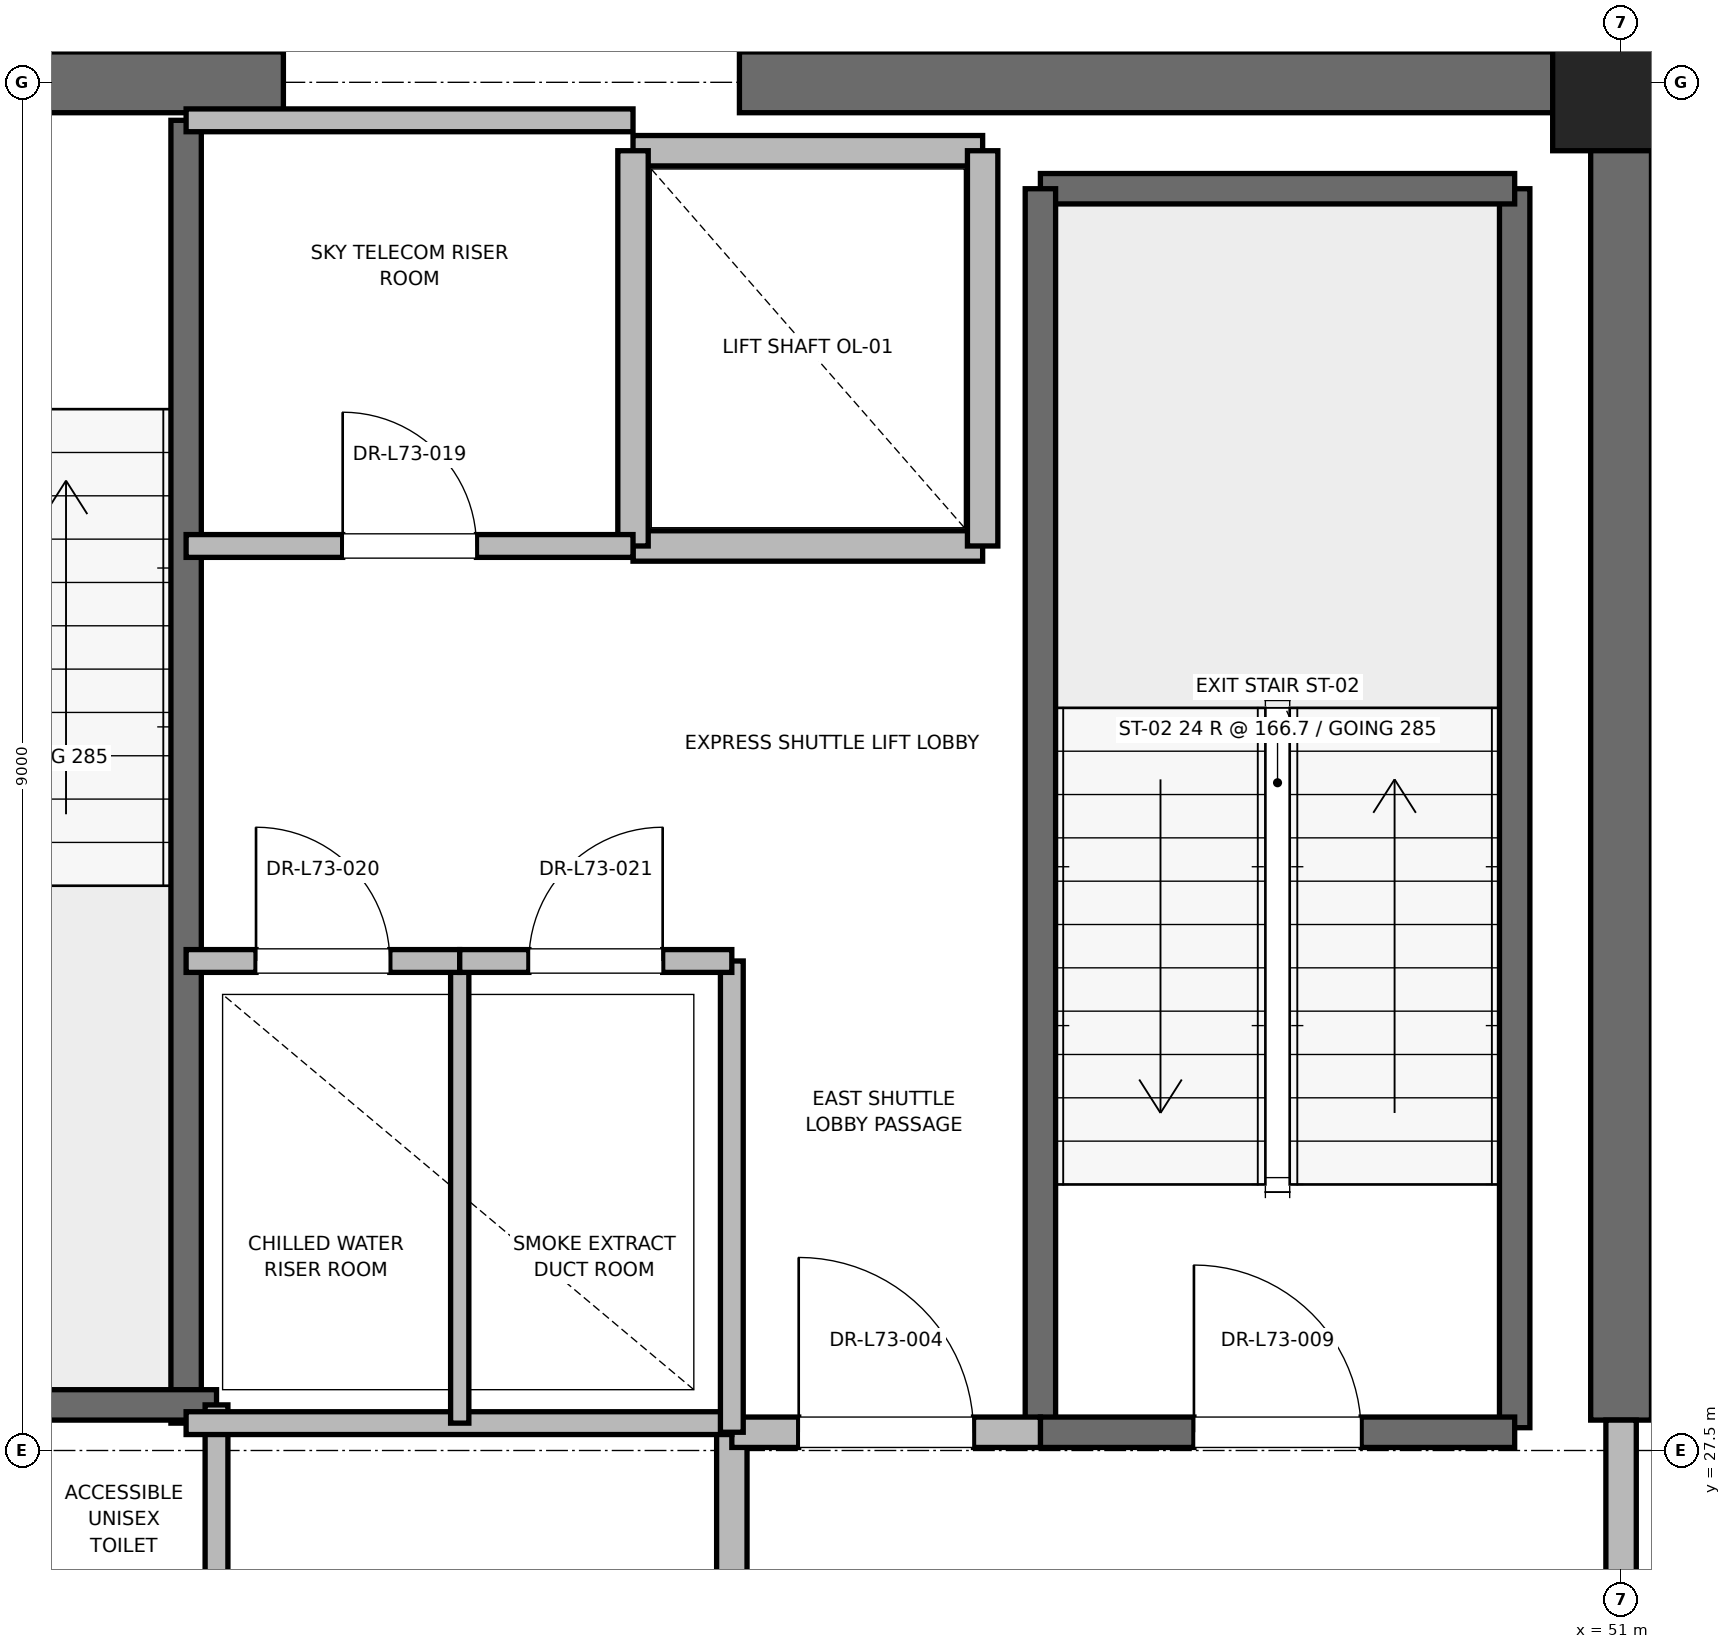
"""IFC4 building model, lengths in metres.
Left out: names, types, materials, properties, quantities, classifications, styles, units other than length and angle.
Written with IfcOpenShell. Run it as: python <this file> out.ifc"""

import sys

from ifc_helpers import new_model, si_unit, direction, frame, frame_2d, origin, origin_2d, place, context, subcontext, project, spatial, rectangle, extrude, element, fill, save


model = new_model("IFC4")
c1 = context("Model", 3, precision=1e-05, world=origin(), true_north=direction((0.0, 1.0)))
c2 = subcontext(c1, "Body", "Model", "MODEL_VIEW")
j1 = project(units=[si_unit("LENGTHUNIT", "METRE"), si_unit("PLANEANGLEUNIT", "RADIAN")], contexts=[c1])
p1 = place(None, origin())
s1 = spatial("IfcSite", under=j1, at=p1, CompositionType="ELEMENT")
p2 = place(p1, origin())
s2 = spatial("IfcBuilding", under=s1, at=p2, CompositionType="ELEMENT")
p3 = place(p2, frame((0.0, 0.0, 314.8)))
s3 = spatial("IfcBuildingStorey", under=s2, at=p3, CompositionType="ELEMENT", Elevation=314.8)
p4 = place(p3, frame((51.0, 36.5, 0.0), z_axis=(0.0, 0.0, 1.0), x_axis=(1.0, 0.0, 0.0)))
e1 = element("IfcColumn", 1, at=p4, inside=s3, PredefinedType="PILASTER", context=c2, shape_type="SweptSolid", body=[
    extrude(rectangle(XDim=0.9, YDim=0.9, at=origin_2d()), origin(), (0.0, 0.0, 1.0), 4.0),
])
p5 = place(p3, frame((37.8, 36.5, 0.0), z_axis=(0.0, 0.0, 1.0), x_axis=(1.0, 0.0, 0.0)))
e2 = element("IfcWall", 2, at=p5, inside=s3, PredefinedType="SHEAR", context=c2, shape_type="SweptSolid", body=[
    extrude(rectangle(XDim=4.4, YDim=0.4, at=frame_2d((2.2, 0.0))), origin(), (0.0, 0.0, 1.0), 3.785),
])
p6 = place(p5, frame((1.65, 0.0, 0.0)))
e3 = element("IfcOpeningElement", 3, at=p6, cuts=e2, PredefinedType="OPENING", context=c2, shape_type="SweptSolid", body=[
    extrude(rectangle(XDim=1.1, YDim=2.15, at=frame_2d((0.55, 1.075))), frame((0.0, 0.2, 0.0), z_axis=(0.0, -1.0, 0.0), x_axis=(1.0, 0.0, 0.0)), (0.0, 0.0, 1.0), 0.4),
])
p7 = place(p3, frame((45.2, 36.5, 0.0), z_axis=(0.0, 0.0, 1.0), x_axis=(1.0, 0.0, 0.0)))
e4 = element("IfcWall", 4, at=p7, inside=s3, PredefinedType="SHEAR", context=c2, shape_type="SweptSolid", body=[
    extrude(rectangle(XDim=5.8, YDim=0.4, at=frame_2d((2.9, 0.0))), origin(), (0.0, 0.0, 1.0), 3.785),
])
p8 = place(p3, frame((51.0, 27.7, 0.0), z_axis=(0.0, 0.0, 1.0), x_axis=(0.0, 1.0, 0.0)))
e5 = element("IfcWall", 5, at=p8, inside=s3, PredefinedType="SHEAR", context=c2, shape_type="SweptSolid", body=[
    extrude(rectangle(XDim=8.8, YDim=0.4, at=frame_2d((4.4, 0.0))), origin(), (0.0, 0.0, 1.0), 3.785),
])
p9 = place(p3, frame((50.3, 27.65, 0.0), z_axis=(0.0, 0.0, 1.0), x_axis=(0.0, 1.0, 0.0)))
e6 = element("IfcWall", 6, at=p9, inside=s3, PredefinedType="SOLIDWALL", context=c2, shape_type="SweptSolid", body=[
    extrude(rectangle(XDim=8.15, YDim=0.2, at=frame_2d((4.075, 0.0))), origin(), (0.0, 0.0, 1.0), 3.785),
])
p10 = place(p3, frame((47.18, 35.8, 0.0), z_axis=(0.0, 0.0, 1.0), x_axis=(1.0, 0.0, 0.0)))
e7 = element("IfcWall", 7, at=p10, inside=s3, PredefinedType="SOLIDWALL", context=c2, shape_type="SweptSolid", body=[
    extrude(rectangle(XDim=3.12, YDim=0.2, at=frame_2d((1.56, 0.0))), origin(), (0.0, 0.0, 1.0), 3.785),
])
p11 = place(p3, frame((47.18, 27.62, 0.0), z_axis=(0.0, 0.0, 1.0), x_axis=(0.0, 1.0, 0.0)))
e8 = element("IfcWall", 8, at=p11, inside=s3, PredefinedType="SOLIDWALL", context=c2, shape_type="SweptSolid", body=[
    extrude(rectangle(XDim=8.18, YDim=0.2, at=frame_2d((4.09, 0.0))), origin(), (0.0, 0.0, 1.0), 3.785),
])
p12 = place(p3, frame((47.18, 27.62, 0.0), z_axis=(0.0, 0.0, 1.0), x_axis=(1.0, 0.0, 0.0)))
e9 = element("IfcWall", 9, at=p12, inside=s3, PredefinedType="SOLIDWALL", context=c2, shape_type="SweptSolid", body=[
    extrude(rectangle(XDim=3.12, YDim=0.2, at=frame_2d((1.56, 0.0))), origin(), (0.0, 0.0, 1.0), 3.785),
])
p13 = place(p12, frame((1.01, 0.0, 0.0)))
e10 = element("IfcOpeningElement", 10, at=p13, cuts=e9, PredefinedType="OPENING", context=c2, shape_type="SweptSolid", body=[
    extrude(rectangle(XDim=1.1, YDim=2.15, at=frame_2d((0.55, 1.075))), frame((0.0, 0.1, 0.0), z_axis=(0.0, -1.0, 0.0), x_axis=(1.0, 0.0, 0.0)), (0.0, 0.0, 1.0), 0.2),
])
p14 = place(p3, frame((41.56, 27.68, 0.0), z_axis=(0.0, 0.0, 1.0), x_axis=(0.0, 1.0, 0.0)))
e11 = element("IfcWall", 11, at=p14, inside=s3, PredefinedType="SOLIDWALL", context=c2, shape_type="SweptSolid", body=[
    extrude(rectangle(XDim=8.57, YDim=0.2, at=frame_2d((4.285, 0.0))), origin(), (0.0, 0.0, 1.0), 3.785),
])
p15 = place(p3, frame((38.44, 27.8, 0.0), z_axis=(0.0, 0.0, 1.0), x_axis=(1.0, 0.0, 0.0)))
e12 = element("IfcWall", 12, at=p15, inside=s3, PredefinedType="SOLIDWALL", context=c2, shape_type="SweptSolid", body=[
    extrude(rectangle(XDim=3.32, YDim=0.2, at=frame_2d((1.66, 0.0))), origin(), (0.0, 0.0, 1.0), 3.785),
])
p16 = place(p3, frame((45.15, 24.25, 0.0), z_axis=(0.0, 0.0, 1.0), x_axis=(0.0, 1.0, 0.0)))
e13 = element("IfcWall", 13, at=p16, inside=s3, PredefinedType="PARTITIONING", context=c2, shape_type="SweptSolid", body=[
    extrude(rectangle(XDim=3.37, YDim=0.2, at=frame_2d((1.685, 0.0))), origin(), (0.0, 0.0, 1.0), 3.785),
])
p17 = place(p3, frame((45.15, 27.62, 0.0), z_axis=(0.0, 0.0, 1.0), x_axis=(1.0, 0.0, 0.0)))
e14 = element("IfcWall", 14, at=p17, inside=s3, PredefinedType="PARTITIONING", context=c2, shape_type="SweptSolid", body=[
    extrude(rectangle(XDim=2.03, YDim=0.2, at=frame_2d((1.015, 0.0))), origin(), (0.0, 0.0, 1.0), 3.785),
])
p18 = place(p17, frame((0.44, 0.0, 0.0)))
e15 = element("IfcOpeningElement", 15, at=p18, cuts=e14, PredefinedType="OPENING", context=c2, shape_type="SweptSolid", body=[
    extrude(rectangle(XDim=1.15, YDim=2.2, at=frame_2d((0.575, 1.1))), frame((0.0, 0.1, 0.0), z_axis=(0.0, -1.0, 0.0), x_axis=(1.0, 0.0, 0.0)), (0.0, 0.0, 1.0), 0.2),
])
p19 = place(p3, frame((51.0, 24.3, 0.0), z_axis=(0.0, 0.0, 1.0), x_axis=(0.0, 1.0, 0.0)))
e16 = element("IfcWall", 16, at=p19, inside=s3, PredefinedType="PARTITIONING", context=c2, shape_type="SweptSolid", body=[
    extrude(rectangle(XDim=3.4, YDim=0.2, at=frame_2d((1.7, 0.0))), origin(), (0.0, 0.0, 1.0), 2.865),
])
p20 = place(p19, frame((1.125, 0.0, 0.0)))
e17 = element("IfcOpeningElement", 17, at=p20, cuts=e16, PredefinedType="OPENING", context=c2, shape_type="SweptSolid", body=[
    extrude(rectangle(XDim=1.15, YDim=2.2, at=frame_2d((0.575, 1.1))), frame((0.0, 0.1, 0.0), z_axis=(0.0, -1.0, 0.0), x_axis=(1.0, 0.0, 0.0)), (0.0, 0.0, 1.0), 0.2),
])
p21 = place(p3, frame((44.5, 33.45, 0.0), z_axis=(0.0, 0.0, 1.0), x_axis=(1.0, 0.0, 0.0)))
e18 = element("IfcWall", 18, at=p21, inside=s3, PredefinedType="SOLIDWALL", context=c2, shape_type="SweptSolid", body=[
    extrude(rectangle(XDim=2.3, YDim=0.2, at=frame_2d((1.15, 0.0))), origin(), (0.0, 0.0, 1.0), 3.785),
])
p22 = place(p3, frame((46.8, 36.05, 0.0), z_axis=(0.0, 0.0, 1.0), x_axis=(-1.0, 0.0, 0.0)))
e19 = element("IfcWall", 19, at=p22, inside=s3, PredefinedType="SOLIDWALL", context=c2, shape_type="SweptSolid", body=[
    extrude(rectangle(XDim=2.3, YDim=0.2, at=frame_2d((1.15, 0.0))), origin(), (0.0, 0.0, 1.0), 2.865),
])
p23 = place(p3, frame((44.5, 36.05, 0.0), z_axis=(0.0, 0.0, 1.0), x_axis=(0.0, -1.0, 0.0)))
e20 = element("IfcWall", 20, at=p23, inside=s3, PredefinedType="SOLIDWALL", context=c2, shape_type="SweptSolid", body=[
    extrude(rectangle(XDim=2.6, YDim=0.2, at=frame_2d((1.3, 0.0))), origin(), (0.0, 0.0, 1.0), 2.865),
])
p24 = place(p3, frame((46.8, 33.45, 0.0), z_axis=(0.0, 0.0, 1.0), x_axis=(0.0, 1.0, 0.0)))
e21 = element("IfcWall", 21, at=p24, inside=s3, PredefinedType="SOLIDWALL", context=c2, shape_type="SweptSolid", body=[
    extrude(rectangle(XDim=2.6, YDim=0.2, at=frame_2d((1.3, 0.0))), origin(), (0.0, 0.0, 1.0), 3.785),
])
p25 = place(p3, frame((41.76, 23.8, 0.0), z_axis=(0.0, 0.0, 1.0), x_axis=(0.0, 1.0, 0.0)))
e22 = element("IfcWall", 22, at=p25, inside=s3, PredefinedType="PARTITIONING", context=c2, shape_type="SweptSolid", body=[
    extrude(rectangle(XDim=4.0, YDim=0.15, at=frame_2d((2.0, 0.0))), origin(), (0.0, 0.0, 1.0), 2.85),
])
p26 = place(p3, frame((41.56, 27.68, 0.0), z_axis=(0.0, 0.0, 1.0), x_axis=(1.0, 0.0, 0.0)))
e23 = element("IfcWall", 23, at=p26, inside=s3, PredefinedType="PARTITIONING", context=c2, shape_type="SweptSolid", body=[
    extrude(rectangle(XDim=3.59, YDim=0.15, at=frame_2d((1.795, 0.0))), origin(), (0.0, 0.0, 1.0), 2.85),
])
p27 = place(p3, frame((45.15, 27.62, 0.0), z_axis=(0.0, 0.0, 1.0), x_axis=(0.0, 1.0, 0.0)))
e24 = element("IfcWall", 24, at=p27, inside=s3, PredefinedType="PARTITIONING", context=c2, shape_type="SweptSolid", body=[
    extrude(rectangle(XDim=3.1, YDim=0.15, at=frame_2d((1.55, 0.0))), origin(), (0.0, 0.0, 1.0), 2.85),
])
p28 = place(p3, frame((43.36, 27.68, 0.0), z_axis=(0.0, 0.0, 1.0), x_axis=(0.0, 1.0, 0.0)))
e25 = element("IfcWall", 25, at=p28, inside=s3, PredefinedType="PARTITIONING", context=c2, shape_type="SweptSolid", body=[
    extrude(rectangle(XDim=3.04, YDim=0.12, at=frame_2d((1.52, 0.0))), origin(), (0.0, 0.0, 1.0), 2.85),
])
p29 = place(p3, frame((41.56, 30.72, 0.0), z_axis=(0.0, 0.0, 1.0), x_axis=(1.0, 0.0, 0.0)))
e26 = element("IfcWall", 26, at=p29, inside=s3, PredefinedType="PARTITIONING", context=c2, shape_type="SweptSolid", body=[
    extrude(rectangle(XDim=1.8, YDim=0.15, at=frame_2d((0.9, 0.0))), origin(), (0.0, 0.0, 1.0), 2.85),
])
p30 = place(p29, frame((0.46, 0.0, 0.0)))
e27 = element("IfcOpeningElement", 27, at=p30, cuts=e26, PredefinedType="OPENING", context=c2, shape_type="SweptSolid", body=[
    extrude(rectangle(XDim=0.88, YDim=2.1, at=frame_2d((0.44, 1.05))), frame((0.0, 0.075, 0.0), z_axis=(0.0, -1.0, 0.0), x_axis=(1.0, 0.0, 0.0)), (0.0, 0.0, 1.0), 0.15),
])
p31 = place(p3, frame((43.36, 30.72, 0.0), z_axis=(0.0, 0.0, 1.0), x_axis=(1.0, 0.0, 0.0)))
e28 = element("IfcWall", 28, at=p31, inside=s3, PredefinedType="PARTITIONING", context=c2, shape_type="SweptSolid", body=[
    extrude(rectangle(XDim=1.79, YDim=0.15, at=frame_2d((0.895, 0.0))), origin(), (0.0, 0.0, 1.0), 2.85),
])
p32 = place(p31, frame((0.455, 0.0, 0.0)))
e29 = element("IfcOpeningElement", 29, at=p32, cuts=e28, PredefinedType="OPENING", context=c2, shape_type="SweptSolid", body=[
    extrude(rectangle(XDim=0.88, YDim=2.1, at=frame_2d((0.44, 1.05))), frame((0.0, 0.075, 0.0), z_axis=(0.0, -1.0, 0.0), x_axis=(1.0, 0.0, 0.0)), (0.0, 0.0, 1.0), 0.15),
])
p33 = place(p3, frame((41.56, 36.25, 0.0), z_axis=(0.0, 0.0, 1.0), x_axis=(1.0, 0.0, 0.0)))
e30 = element("IfcWall", 30, at=p33, inside=s3, PredefinedType="PARTITIONING", context=c2, shape_type="SweptSolid", body=[
    extrude(rectangle(XDim=2.94, YDim=0.15, at=frame_2d((1.47, 0.0))), origin(), (0.0, 0.0, 1.0), 2.85),
])
p34 = place(p3, frame((41.56, 33.45, 0.0), z_axis=(0.0, 0.0, 1.0), x_axis=(1.0, 0.0, 0.0)))
e31 = element("IfcWall", 31, at=p34, inside=s3, PredefinedType="PARTITIONING", context=c2, shape_type="SweptSolid", body=[
    extrude(rectangle(XDim=2.94, YDim=0.15, at=frame_2d((1.47, 0.0))), origin(), (0.0, 0.0, 1.0), 2.85),
])
p35 = place(p34, frame((1.03, 0.0, 0.0)))
e32 = element("IfcOpeningElement", 32, at=p35, cuts=e31, PredefinedType="OPENING", context=c2, shape_type="SweptSolid", body=[
    extrude(rectangle(XDim=0.88, YDim=2.1, at=frame_2d((0.44, 1.05))), frame((0.0, 0.075, 0.0), z_axis=(0.0, -1.0, 0.0), x_axis=(1.0, 0.0, 0.0)), (0.0, 0.0, 1.0), 0.15),
])
p36 = place(p13, origin())
e33 = element("IfcDoor", 33, at=p36, inside=s3, OperationType="SINGLE_SWING_LEFT", PredefinedType="DOOR", context=c2, shape_type="SweptSolid", body=[
    extrude(rectangle(XDim=1.1, YDim=2.15, at=frame_2d((0.55, 1.075))), frame((0.0, 0.025, 0.0), z_axis=(0.0, -1.0, 0.0), x_axis=(1.0, 0.0, 0.0)), (0.0, 0.0, 1.0), 0.05),
])
fill(e10, e33)
p37 = place(p18, origin())
e34 = element("IfcDoor", 34, at=p37, inside=s3, OperationType="SINGLE_SWING_LEFT", PredefinedType="DOOR", context=c2, shape_type="SweptSolid", body=[
    extrude(rectangle(XDim=1.15, YDim=2.2, at=frame_2d((0.575, 1.1))), frame((0.0, 0.025, 0.0), z_axis=(0.0, -1.0, 0.0), x_axis=(1.0, 0.0, 0.0)), (0.0, 0.0, 1.0), 0.05),
])
fill(e15, e34)
p38 = place(p30, origin())
e35 = element("IfcDoor", 35, at=p38, inside=s3, OperationType="SINGLE_SWING_LEFT", PredefinedType="DOOR", context=c2, shape_type="SweptSolid", body=[
    extrude(rectangle(XDim=0.88, YDim=2.1, at=frame_2d((0.44, 1.05))), frame((0.0, 0.025, 0.0), z_axis=(0.0, -1.0, 0.0), x_axis=(1.0, 0.0, 0.0)), (0.0, 0.0, 1.0), 0.05),
])
fill(e27, e35)
p39 = place(p32, origin())
e36 = element("IfcDoor", 36, at=p39, inside=s3, OperationType="SINGLE_SWING_RIGHT", PredefinedType="DOOR", context=c2, shape_type="SweptSolid", body=[
    extrude(rectangle(XDim=0.88, YDim=2.1, at=frame_2d((0.44, 1.05))), frame((0.0, 0.025, 0.0), z_axis=(0.0, -1.0, 0.0), x_axis=(1.0, 0.0, 0.0)), (0.0, 0.0, 1.0), 0.05),
])
fill(e29, e36)
p40 = place(p35, origin())
e37 = element("IfcDoor", 37, at=p40, inside=s3, OperationType="SINGLE_SWING_LEFT", PredefinedType="DOOR", context=c2, shape_type="SweptSolid", body=[
    extrude(rectangle(XDim=0.88, YDim=2.1, at=frame_2d((0.44, 1.05))), frame((0.0, 0.025, 0.0), z_axis=(0.0, -1.0, 0.0), x_axis=(1.0, 0.0, 0.0)), (0.0, 0.0, 1.0), 0.05),
])
fill(e32, e37)
save(model, sys.argv[1])
